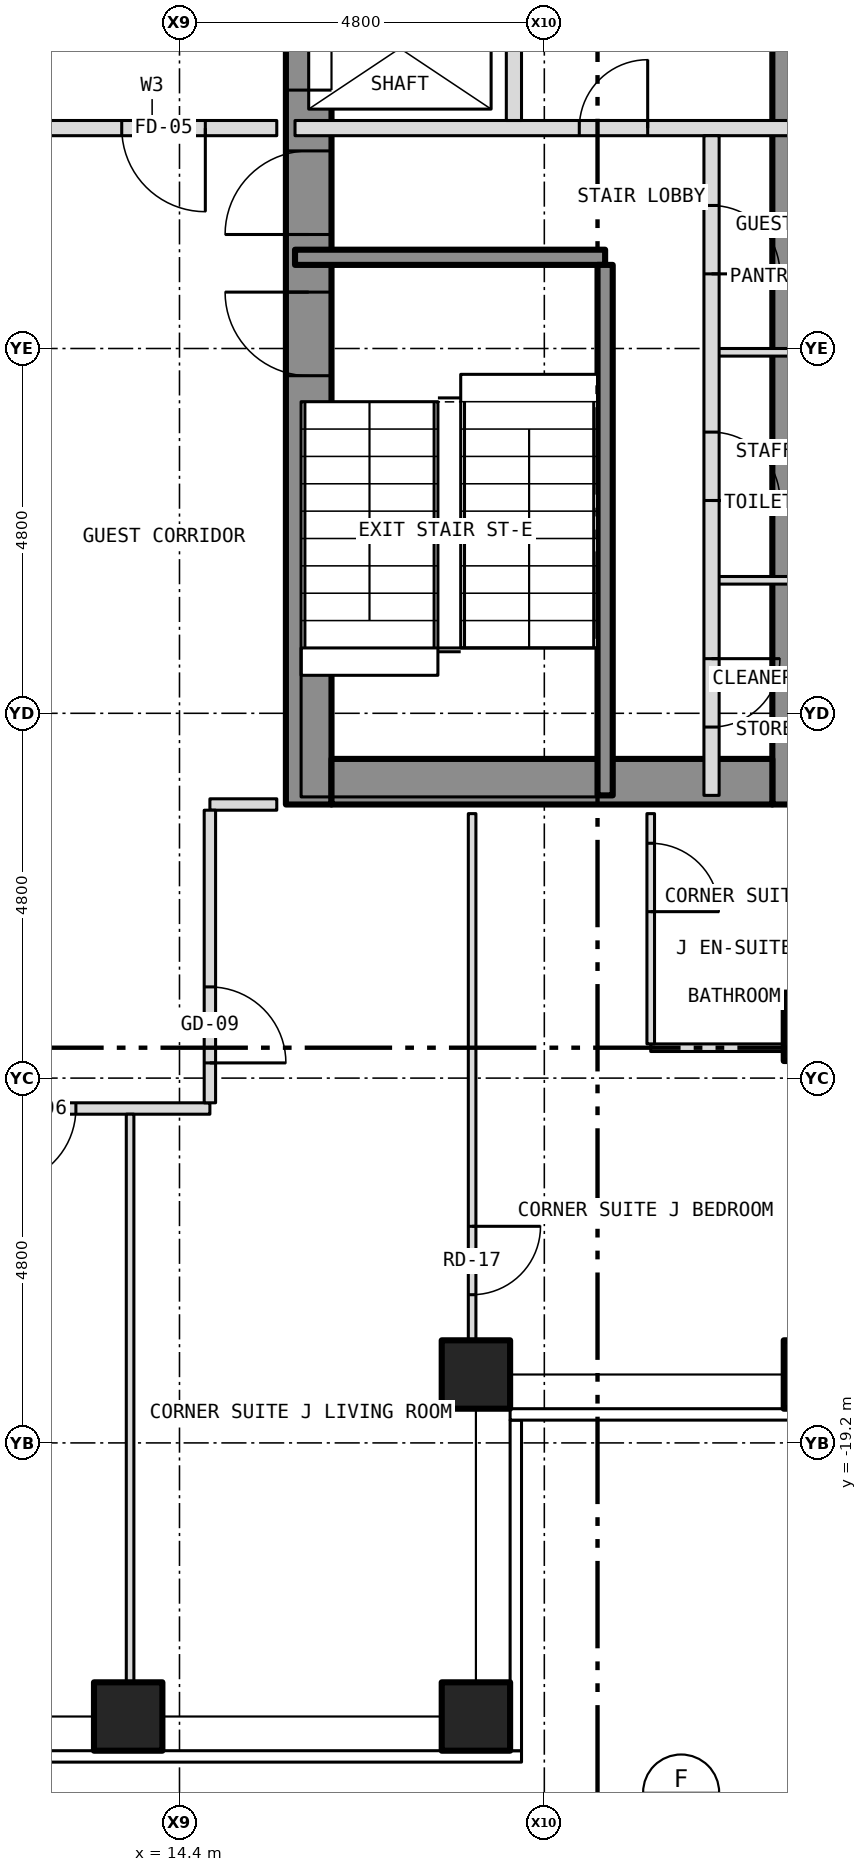
"""IFC4 building model, lengths in metres.
Left out: names, types, materials, properties, quantities, classifications, styles, units other than length and angle.
Written with IfcOpenShell. Run it as: python <this file> out.ifc"""

import sys

from ifc_helpers import new_model, si_unit, direction, frame, frame_2d, origin, origin_2d, place, context, subcontext, project, spatial, rectangle, hollow_rectangle, extrude, element, fill, save


model = new_model("IFC4")
c1 = context("Model", 3, precision=1e-05, world=origin(), true_north=direction((0.0, 1.0)))
c2 = subcontext(c1, "Body", "Model", "MODEL_VIEW")
j1 = project(units=[si_unit("LENGTHUNIT", "METRE"), si_unit("PLANEANGLEUNIT", "RADIAN")], contexts=[c1])
p1 = place(None, origin())
s1 = spatial("IfcSite", under=j1, at=p1, CompositionType="ELEMENT")
p2 = place(p1, origin())
s2 = spatial("IfcBuilding", under=s1, at=p2, CompositionType="ELEMENT")
p3 = place(p2, frame((0.0, 0.0, 113.5)))
s3 = spatial("IfcBuildingStorey", under=s2, at=p3, CompositionType="ELEMENT", Elevation=113.5)
for number, where, z_axis, x_axis in (
    (1, (13.725, -22.8, -0.15), (0.0, 0.0, 1.0), (1.0, 0.0, 0.0)),
    (2, (18.3, -22.8, -0.15), (0.0, 0.0, 1.0), (1.0, 0.0, 0.0)),
    (3, (22.8, -18.3, -0.15), (0.0, 0.0, 1.0), (1.0, 0.0, 0.0)),
    (4, (22.8, -13.725, -0.15), (0.0, 0.0, 1.0), (1.0, 0.0, 0.0)),
    (5, (18.3, -18.3, -0.15), (0.0, 0.0, 1.0), (1.0, 0.0, 0.0)),
):
    element("IfcColumn", number, at=place(p3, frame(where, z_axis=z_axis, x_axis=x_axis)), inside=s3, PredefinedType="COLUMN", context=c2, shape_type="SweptSolid", body=[
        extrude(hollow_rectangle(XDim=0.9, YDim=0.9, WallThickness=0.05, at=origin_2d()), origin(), (0.0, 0.0, 1.0), 3.5),
    ])
p4 = place(p3, frame((16.1, -10.8, 0.0), z_axis=(0.0, 0.0, 1.0), x_axis=(0.0, 1.0, 0.0)))
e6 = element("IfcWall", 6, at=p4, inside=s3, PredefinedType="SHEAR", context=c2, shape_type="SweptSolid", body=[
    extrude(rectangle(XDim=21.6, YDim=0.6, at=frame_2d((10.8, 0.0))), origin(), (0.0, 0.0, 1.0), 3.25),
])
p5 = place(p4, frame((9.4, 0.0, 0.0)))
e7 = element("IfcOpeningElement", 7, at=p5, cuts=e6, PredefinedType="OPENING", context=c2, shape_type="SweptSolid", body=[
    extrude(rectangle(XDim=1.1, YDim=2.1, at=frame_2d((0.55, 1.05))), frame((0.0, 0.312, 0.0), z_axis=(0.0, -1.0, 0.0), x_axis=(1.0, 0.0, 0.0)), (0.0, 0.0, 1.0), 0.624),
])
p6 = place(p4, frame((11.5, 0.0, 0.0)))
e8 = element("IfcOpeningElement", 8, at=p6, cuts=e6, PredefinedType="OPENING", context=c2, shape_type="SweptSolid", body=[
    extrude(rectangle(XDim=1.1, YDim=2.1, at=frame_2d((0.55, 1.05))), frame((0.0, 0.312, 0.0), z_axis=(0.0, -1.0, 0.0), x_axis=(1.0, 0.0, 0.0)), (0.0, 0.0, 1.0), 0.624),
])
p7 = place(p4, frame((13.6, 0.0, 0.0)))
e9 = element("IfcOpeningElement", 9, at=p7, cuts=e6, PredefinedType="OPENING", context=c2, shape_type="SweptSolid", body=[
    extrude(rectangle(XDim=1.1, YDim=2.1, at=frame_2d((0.55, 1.05))), frame((0.0, 0.312, 0.0), z_axis=(0.0, -1.0, 0.0), x_axis=(1.0, 0.0, 0.0)), (0.0, 0.0, 1.0), 0.624),
])
p8 = place(p4, frame((15.7, 0.0, 0.0)))
e10 = element("IfcOpeningElement", 10, at=p8, cuts=e6, PredefinedType="OPENING", context=c2, shape_type="SweptSolid", body=[
    extrude(rectangle(XDim=1.1, YDim=2.1, at=frame_2d((0.55, 1.05))), frame((0.0, 0.312, 0.0), z_axis=(0.0, -1.0, 0.0), x_axis=(1.0, 0.0, 0.0)), (0.0, 0.0, 1.0), 0.624),
])
p9 = place(p4, frame((17.8, 0.0, 0.0)))
e11 = element("IfcOpeningElement", 11, at=p9, cuts=e6, PredefinedType="OPENING", context=c2, shape_type="SweptSolid", body=[
    extrude(rectangle(XDim=1.1, YDim=2.1, at=frame_2d((0.55, 1.05))), frame((0.0, 0.312, 0.0), z_axis=(0.0, -1.0, 0.0), x_axis=(1.0, 0.0, 0.0)), (0.0, 0.0, 1.0), 0.624),
])
p10 = place(p4, frame((5.642, 0.0, 0.0)))
e12 = element("IfcOpeningElement", 12, at=p10, cuts=e6, PredefinedType="OPENING", context=c2, shape_type="SweptSolid", body=[
    extrude(rectangle(XDim=1.1, YDim=2.1, at=frame_2d((0.55, 1.05))), frame((0.0, 0.312, 0.0), z_axis=(0.0, -1.0, 0.0), x_axis=(1.0, 0.0, 0.0)), (0.0, 0.0, 1.0), 0.624),
])
p11 = place(p4, frame((7.5, 0.0, 0.0)))
e13 = element("IfcOpeningElement", 13, at=p11, cuts=e6, PredefinedType="OPENING", context=c2, shape_type="SweptSolid", body=[
    extrude(rectangle(XDim=1.1, YDim=2.1, at=frame_2d((0.55, 1.05))), frame((0.0, 0.312, 0.0), z_axis=(0.0, -1.0, 0.0), x_axis=(1.0, 0.0, 0.0)), (0.0, 0.0, 1.0), 0.624),
])
p12 = place(p3, frame((22.5, -10.8, 0.0), z_axis=(0.0, 0.0, 1.0), x_axis=(0.0, 1.0, 0.0)))
e14 = element("IfcWall", 14, at=p12, inside=s3, PredefinedType="SHEAR", context=c2, shape_type="SweptSolid", body=[
    extrude(rectangle(XDim=21.6, YDim=0.6, at=frame_2d((10.8, 0.0))), origin(), (0.0, 0.0, 1.0), 3.25),
])
p13 = place(p3, frame((16.4, -10.5, 0.0), z_axis=(0.0, 0.0, 1.0), x_axis=(1.0, 0.0, 0.0)))
e15 = element("IfcWall", 15, at=p13, inside=s3, PredefinedType="SHEAR", context=c2, shape_type="SweptSolid", body=[
    extrude(rectangle(XDim=5.8, YDim=0.6, at=frame_2d((2.9, 0.0))), origin(), (0.0, 0.0, 1.0), 3.25),
])
p14 = place(p3, frame((-14.8, -14.8, 0.0), z_axis=(0.0, 0.0, 1.0), x_axis=(1.0, 0.0, 0.0)))
e16 = element("IfcWall", 16, at=p14, inside=s3, PredefinedType="PARTITIONING", context=c2, shape_type="SweptSolid", body=[
    extrude(rectangle(XDim=29.6, YDim=0.15, at=frame_2d((14.8, 0.0))), origin(), (0.0, 0.0, 1.0), 3.35),
])
p15 = place(p14, frame((2.634, 0.0, 0.0)))
e17 = element("IfcOpeningElement", 17, at=p15, cuts=e16, PredefinedType="OPENING", context=c2, shape_type="SweptSolid", body=[
    extrude(rectangle(XDim=1.0, YDim=2.1, at=frame_2d((0.5, 1.05))), frame((0.0, 0.087, 0.0), z_axis=(0.0, -1.0, 0.0), x_axis=(1.0, 0.0, 0.0)), (0.0, 0.0, 1.0), 0.174),
])
p16 = place(p14, frame((20.362, 0.0, 0.0)))
e18 = element("IfcOpeningElement", 18, at=p16, cuts=e16, PredefinedType="OPENING", context=c2, shape_type="SweptSolid", body=[
    extrude(rectangle(XDim=1.0, YDim=2.1, at=frame_2d((0.5, 1.05))), frame((0.0, 0.087, 0.0), z_axis=(0.0, -1.0, 0.0), x_axis=(1.0, 0.0, 0.0)), (0.0, 0.0, 1.0), 0.174),
])
p17 = place(p14, frame((26.837, 0.0, 0.0)))
e19 = element("IfcOpeningElement", 19, at=p17, cuts=e16, PredefinedType="OPENING", context=c2, shape_type="SweptSolid", body=[
    extrude(rectangle(XDim=1.0, YDim=2.1, at=frame_2d((0.5, 1.05))), frame((0.0, 0.087, 0.0), z_axis=(0.0, -1.0, 0.0), x_axis=(1.0, 0.0, 0.0)), (0.0, 0.0, 1.0), 0.174),
])
p18 = place(p3, frame((20.6, -14.0, 0.0), z_axis=(0.0, 0.0, 1.0), x_axis=(1.0, 0.0, 0.0)))
e20 = element("IfcWall", 20, at=p18, inside=s3, PredefinedType="PARTITIONING", context=c2, shape_type="SweptSolid", body=[
    extrude(rectangle(XDim=2.08, YDim=0.1, at=frame_2d((1.04, 0.0))), origin(), (0.0, 0.0, 1.0), 3.35),
])
p19 = place(p3, frame((14.8, -10.8, 0.0), z_axis=(0.0, 0.0, 1.0), x_axis=(1.0, 0.0, 0.0)))
e21 = element("IfcWall", 21, at=p19, inside=s3, PredefinedType="PARTITIONING", context=c2, shape_type="SweptSolid", body=[
    extrude(rectangle(XDim=0.88, YDim=0.15, at=frame_2d((0.44, 0.0))), origin(), (0.0, 0.0, 1.0), 3.35),
])
for number, where, z_axis, x_axis in (
    (22, (21.4, -7.85, 0.0), (0.0, 0.0, 1.0), (1.0, 0.0, 0.0)),
    (23, (21.4, -4.85, 0.0), (0.0, 0.0, 1.0), (1.0, 0.0, 0.0)),
):
    element("IfcWall", number, at=place(p3, frame(where, z_axis=z_axis, x_axis=x_axis)), inside=s3, PredefinedType="PARTITIONING", context=c2, shape_type="SweptSolid", body=[
        extrude(rectangle(XDim=1.28, YDim=0.1, at=frame_2d((0.64, 0.0))), origin(), (0.0, 0.0, 1.0), 3.25),
    ])
p20 = place(p3, frame((15.92, -3.6, 0.0), z_axis=(0.0, 0.0, 1.0), x_axis=(1.0, 0.0, 0.0)))
e24 = element("IfcWall", 24, at=p20, inside=s3, PredefinedType="SHEAR", context=c2, shape_type="SweptSolid", body=[
    extrude(rectangle(XDim=4.08, YDim=0.2, at=frame_2d((2.04, 0.0))), origin(), (0.0, 0.0, 1.0), 3.25),
])
p21 = place(p3, frame((12.4, -1.9, 0.0), z_axis=(0.0, 0.0, 1.0), x_axis=(1.0, 0.0, 0.0)))
e25 = element("IfcWall", 25, at=p21, inside=s3, PredefinedType="PARTITIONING", context=c2, shape_type="SweptSolid", body=[
    extrude(rectangle(XDim=3.28, YDim=0.2, at=frame_2d((1.64, 0.0))), origin(), (0.0, 0.0, 1.0), 3.35),
])
p22 = place(p21, frame((1.24, 0.0, 0.0)))
e26 = element("IfcOpeningElement", 26, at=p22, cuts=e25, PredefinedType="OPENING", context=c2, shape_type="SweptSolid", body=[
    extrude(rectangle(XDim=1.1, YDim=2.1, at=frame_2d((0.55, 1.05))), frame((0.0, 0.112, 0.0), z_axis=(0.0, -1.0, 0.0), x_axis=(1.0, 0.0, 0.0)), (0.0, 0.0, 1.0), 0.224),
])
p23 = place(p3, frame((15.92, -1.9, 0.0), z_axis=(0.0, 0.0, 1.0), x_axis=(1.0, 0.0, 0.0)))
e27 = element("IfcWall", 27, at=p23, inside=s3, PredefinedType="PARTITIONING", context=c2, shape_type="SweptSolid", body=[
    extrude(rectangle(XDim=6.76, YDim=0.2, at=frame_2d((3.38, 0.0))), origin(), (0.0, 0.0, 1.0), 3.25),
])
p24 = place(p23, frame((3.74, 0.0, 0.0)))
e28 = element("IfcOpeningElement", 28, at=p24, cuts=e27, PredefinedType="OPENING", context=c2, shape_type="SweptSolid", body=[
    extrude(rectangle(XDim=0.9, YDim=2.1, at=frame_2d((0.45, 1.05))), frame((0.0, 0.112, 0.0), z_axis=(0.0, -1.0, 0.0), x_axis=(1.0, 0.0, 0.0)), (0.0, 0.0, 1.0), 0.224),
])
p25 = place(p3, frame((13.75, -22.68, 0.0), z_axis=(0.0, 0.0, 1.0), x_axis=(0.0, 1.0, 0.0)))
e29 = element("IfcWall", 29, at=p25, inside=s3, PredefinedType="PARTITIONING", context=c2, shape_type="SweptSolid", body=[
    extrude(rectangle(XDim=7.805, YDim=0.1, at=frame_2d((3.902, 0.0))), origin(), (0.0, 0.0, 1.0), 3.35),
])
p26 = place(p3, frame((14.8, -14.725, 0.0), z_axis=(0.0, 0.0, 1.0), x_axis=(0.0, 1.0, 0.0)))
e30 = element("IfcWall", 30, at=p26, inside=s3, PredefinedType="PARTITIONING", context=c2, shape_type="SweptSolid", body=[
    extrude(rectangle(XDim=3.85, YDim=0.15, at=frame_2d((1.925, 0.0))), origin(), (0.0, 0.0, 1.0), 3.35),
])
p27 = place(p26, frame((0.525, 0.0, 0.0)))
e31 = element("IfcOpeningElement", 31, at=p27, cuts=e30, PredefinedType="OPENING", context=c2, shape_type="SweptSolid", body=[
    extrude(rectangle(XDim=1.0, YDim=2.1, at=frame_2d((0.5, 1.05))), frame((0.0, 0.087, 0.0), z_axis=(0.0, -1.0, 0.0), x_axis=(1.0, 0.0, 0.0)), (0.0, 0.0, 1.0), 0.174),
])
p28 = place(p3, frame((18.25, -18.191, 0.0), z_axis=(0.0, 0.0, 1.0), x_axis=(0.0, 1.0, 0.0)))
e32 = element("IfcWall", 32, at=p28, inside=s3, PredefinedType="PARTITIONING", context=c2, shape_type="SweptSolid", body=[
    extrude(rectangle(XDim=7.271, YDim=0.1, at=frame_2d((3.635, 0.0))), origin(), (0.0, 0.0, 1.0), 3.35),
])
p29 = place(p28, frame((0.941, 0.0, 0.0)))
e33 = element("IfcOpeningElement", 33, at=p29, cuts=e32, PredefinedType="OPENING", context=c2, shape_type="SweptSolid", body=[
    extrude(rectangle(XDim=0.9, YDim=2.1, at=frame_2d((0.45, 1.05))), frame((0.0, 0.062, 0.0), z_axis=(0.0, -1.0, 0.0), x_axis=(1.0, 0.0, 0.0)), (0.0, 0.0, 1.0), 0.124),
])
p30 = place(p3, frame((18.8, -1.8, 0.0), z_axis=(0.0, 0.0, 1.0), x_axis=(0.0, 1.0, 0.0)))
e34 = element("IfcWall", 34, at=p30, inside=s3, PredefinedType="PARTITIONING", context=c2, shape_type="SweptSolid", body=[
    extrude(rectangle(XDim=12.48, YDim=0.2, at=frame_2d((6.24, 0.0))), origin(), (0.0, 0.0, 1.0), 3.25),
])
p31 = place(p3, frame((20.0, -10.68, 0.0), z_axis=(0.0, 0.0, 1.0), x_axis=(0.0, 1.0, 0.0)))
e35 = element("IfcWall", 35, at=p31, inside=s3, PredefinedType="SHEAR", context=c2, shape_type="SweptSolid", body=[
    extrude(rectangle(XDim=6.98, YDim=0.2, at=frame_2d((3.49, 0.0))), origin(), (0.0, 0.0, 1.0), 3.25),
])
p32 = place(p3, frame((20.6, -13.95, 0.0), z_axis=(0.0, 0.0, 1.0), x_axis=(0.0, 1.0, 0.0)))
e36 = element("IfcWall", 36, at=p32, inside=s3, PredefinedType="PARTITIONING", context=c2, shape_type="SweptSolid", body=[
    extrude(rectangle(XDim=3.03, YDim=0.1, at=frame_2d((1.515, 0.0))), origin(), (0.0, 0.0, 1.0), 3.35),
])
p33 = place(p32, frame((1.74, 0.0, 0.0)))
e37 = element("IfcOpeningElement", 37, at=p33, cuts=e36, PredefinedType="OPENING", context=c2, shape_type="SweptSolid", body=[
    extrude(rectangle(XDim=0.9, YDim=2.1, at=frame_2d((0.45, 1.05))), frame((0.0, 0.062, 0.0), z_axis=(0.0, -1.0, 0.0), x_axis=(1.0, 0.0, 0.0)), (0.0, 0.0, 1.0), 0.124),
])
p34 = place(p3, frame((21.4, -10.68, 0.0), z_axis=(0.0, 0.0, 1.0), x_axis=(0.0, 1.0, 0.0)))
e38 = element("IfcWall", 38, at=p34, inside=s3, PredefinedType="PARTITIONING", context=c2, shape_type="SweptSolid", body=[
    extrude(rectangle(XDim=8.68, YDim=0.2, at=frame_2d((4.34, 0.0))), origin(), (0.0, 0.0, 1.0), 3.25),
])
p35 = place(p34, frame((0.899, 0.0, 0.0)))
e39 = element("IfcOpeningElement", 39, at=p35, cuts=e38, PredefinedType="OPENING", context=c2, shape_type="SweptSolid", body=[
    extrude(rectangle(XDim=0.9, YDim=2.1, at=frame_2d((0.45, 1.05))), frame((0.0, 0.112, 0.0), z_axis=(0.0, -1.0, 0.0), x_axis=(1.0, 0.0, 0.0)), (0.0, 0.0, 1.0), 0.224),
])
p36 = place(p34, frame((3.88, 0.0, 0.0)))
e40 = element("IfcOpeningElement", 40, at=p36, cuts=e38, PredefinedType="OPENING", context=c2, shape_type="SweptSolid", body=[
    extrude(rectangle(XDim=0.9, YDim=2.1, at=frame_2d((0.45, 1.05))), frame((0.0, 0.112, 0.0), z_axis=(0.0, -1.0, 0.0), x_axis=(1.0, 0.0, 0.0)), (0.0, 0.0, 1.0), 0.224),
])
p37 = place(p34, frame((6.862, 0.0, 0.0)))
e41 = element("IfcOpeningElement", 41, at=p37, cuts=e38, PredefinedType="OPENING", context=c2, shape_type="SweptSolid", body=[
    extrude(rectangle(XDim=0.9, YDim=2.1, at=frame_2d((0.45, 1.05))), frame((0.0, 0.112, 0.0), z_axis=(0.0, -1.0, 0.0), x_axis=(1.0, 0.0, 0.0)), (0.0, 0.0, 1.0), 0.224),
])
p38 = place(p5, origin())
e42 = element("IfcDoor", 42, at=p38, inside=s3, OperationType="SLIDING_TO_LEFT", PredefinedType="DOOR", context=c2, shape_type="SweptSolid", body=[
    extrude(rectangle(XDim=1.1, YDim=2.1, at=frame_2d((0.55, 1.05))), frame((0.0, 0.025, 0.0), z_axis=(0.0, -1.0, 0.0), x_axis=(1.0, 0.0, 0.0)), (0.0, 0.0, 1.0), 0.05),
])
fill(e7, e42)
p39 = place(p10, origin())
e43 = element("IfcDoor", 43, at=p39, inside=s3, OperationType="SINGLE_SWING_RIGHT", PredefinedType="DOOR", context=c2, shape_type="SweptSolid", body=[
    extrude(rectangle(XDim=1.1, YDim=2.1, at=frame_2d((0.55, 1.05))), frame((0.0, 0.025, 0.0), z_axis=(0.0, -1.0, 0.0), x_axis=(1.0, 0.0, 0.0)), (0.0, 0.0, 1.0), 0.05),
])
fill(e12, e43)
p40 = place(p11, origin())
e44 = element("IfcDoor", 44, at=p40, inside=s3, OperationType="SINGLE_SWING_LEFT", PredefinedType="DOOR", context=c2, shape_type="SweptSolid", body=[
    extrude(rectangle(XDim=1.1, YDim=2.1, at=frame_2d((0.55, 1.05))), frame((0.0, 0.025, 0.0), z_axis=(0.0, -1.0, 0.0), x_axis=(1.0, 0.0, 0.0)), (0.0, 0.0, 1.0), 0.05),
])
fill(e13, e44)
p41 = place(p35, origin())
e45 = element("IfcDoor", 45, at=p41, inside=s3, OperationType="SINGLE_SWING_RIGHT", PredefinedType="DOOR", context=c2, shape_type="SweptSolid", body=[
    extrude(rectangle(XDim=0.9, YDim=2.1, at=frame_2d((0.45, 1.05))), frame((0.0, 0.025, 0.0), z_axis=(0.0, -1.0, 0.0), x_axis=(1.0, 0.0, 0.0)), (0.0, 0.0, 1.0), 0.05),
])
fill(e39, e45)
p42 = place(p36, origin())
e46 = element("IfcDoor", 46, at=p42, inside=s3, OperationType="SINGLE_SWING_LEFT", PredefinedType="DOOR", context=c2, shape_type="SweptSolid", body=[
    extrude(rectangle(XDim=0.9, YDim=2.1, at=frame_2d((0.45, 1.05))), frame((0.0, 0.025, 0.0), z_axis=(0.0, -1.0, 0.0), x_axis=(1.0, 0.0, 0.0)), (0.0, 0.0, 1.0), 0.05),
])
fill(e40, e46)
p43 = place(p37, origin())
e47 = element("IfcDoor", 47, at=p43, inside=s3, OperationType="SINGLE_SWING_LEFT", PredefinedType="DOOR", context=c2, shape_type="SweptSolid", body=[
    extrude(rectangle(XDim=0.9, YDim=2.1, at=frame_2d((0.45, 1.05))), frame((0.0, 0.025, 0.0), z_axis=(0.0, -1.0, 0.0), x_axis=(1.0, 0.0, 0.0)), (0.0, 0.0, 1.0), 0.05),
])
fill(e41, e47)
p44 = place(p24, origin())
e48 = element("IfcDoor", 48, at=p44, inside=s3, OperationType="SINGLE_SWING_RIGHT", PredefinedType="DOOR", context=c2, shape_type="SweptSolid", body=[
    extrude(rectangle(XDim=0.9, YDim=2.1, at=frame_2d((0.45, 1.05))), frame((0.0, 0.025, 0.0), z_axis=(0.0, -1.0, 0.0), x_axis=(1.0, 0.0, 0.0)), (0.0, 0.0, 1.0), 0.05),
])
fill(e28, e48)
p45 = place(p22, origin())
e49 = element("IfcDoor", 49, at=p45, inside=s3, OperationType="SINGLE_SWING_RIGHT", PredefinedType="DOOR", context=c2, shape_type="SweptSolid", body=[
    extrude(rectangle(XDim=1.1, YDim=2.1, at=frame_2d((0.55, 1.05))), frame((0.0, 0.025, 0.0), z_axis=(0.0, -1.0, 0.0), x_axis=(1.0, 0.0, 0.0)), (0.0, 0.0, 1.0), 0.05),
])
fill(e26, e49)
p46 = place(p17, origin())
e50 = element("IfcDoor", 50, at=p46, inside=s3, OperationType="SINGLE_SWING_LEFT", PredefinedType="DOOR", context=c2, shape_type="SweptSolid", body=[
    extrude(rectangle(XDim=1.0, YDim=2.1, at=frame_2d((0.5, 1.05))), frame((0.0, 0.025, 0.0), z_axis=(0.0, -1.0, 0.0), x_axis=(1.0, 0.0, 0.0)), (0.0, 0.0, 1.0), 0.05),
])
fill(e19, e50)
p47 = place(p27, origin())
e51 = element("IfcDoor", 51, at=p47, inside=s3, OperationType="SINGLE_SWING_LEFT", PredefinedType="DOOR", context=c2, shape_type="SweptSolid", body=[
    extrude(rectangle(XDim=1.0, YDim=2.1, at=frame_2d((0.5, 1.05))), frame((0.0, 0.025, 0.0), z_axis=(0.0, -1.0, 0.0), x_axis=(1.0, 0.0, 0.0)), (0.0, 0.0, 1.0), 0.05),
])
fill(e31, e51)
p48 = place(p29, origin())
e52 = element("IfcDoor", 52, at=p48, inside=s3, OperationType="SINGLE_SWING_RIGHT", PredefinedType="DOOR", context=c2, shape_type="SweptSolid", body=[
    extrude(rectangle(XDim=0.9, YDim=2.1, at=frame_2d((0.45, 1.05))), frame((0.0, 0.025, 0.0), z_axis=(0.0, -1.0, 0.0), x_axis=(1.0, 0.0, 0.0)), (0.0, 0.0, 1.0), 0.05),
])
fill(e33, e52)
p49 = place(p33, origin())
e53 = element("IfcDoor", 53, at=p49, inside=s3, OperationType="SINGLE_SWING_LEFT", PredefinedType="DOOR", context=c2, shape_type="SweptSolid", body=[
    extrude(rectangle(XDim=0.9, YDim=2.1, at=frame_2d((0.45, 1.05))), frame((0.0, 0.025, 0.0), z_axis=(0.0, -1.0, 0.0), x_axis=(1.0, 0.0, 0.0)), (0.0, 0.0, 1.0), 0.05),
])
fill(e37, e53)
save(model, sys.argv[1])
